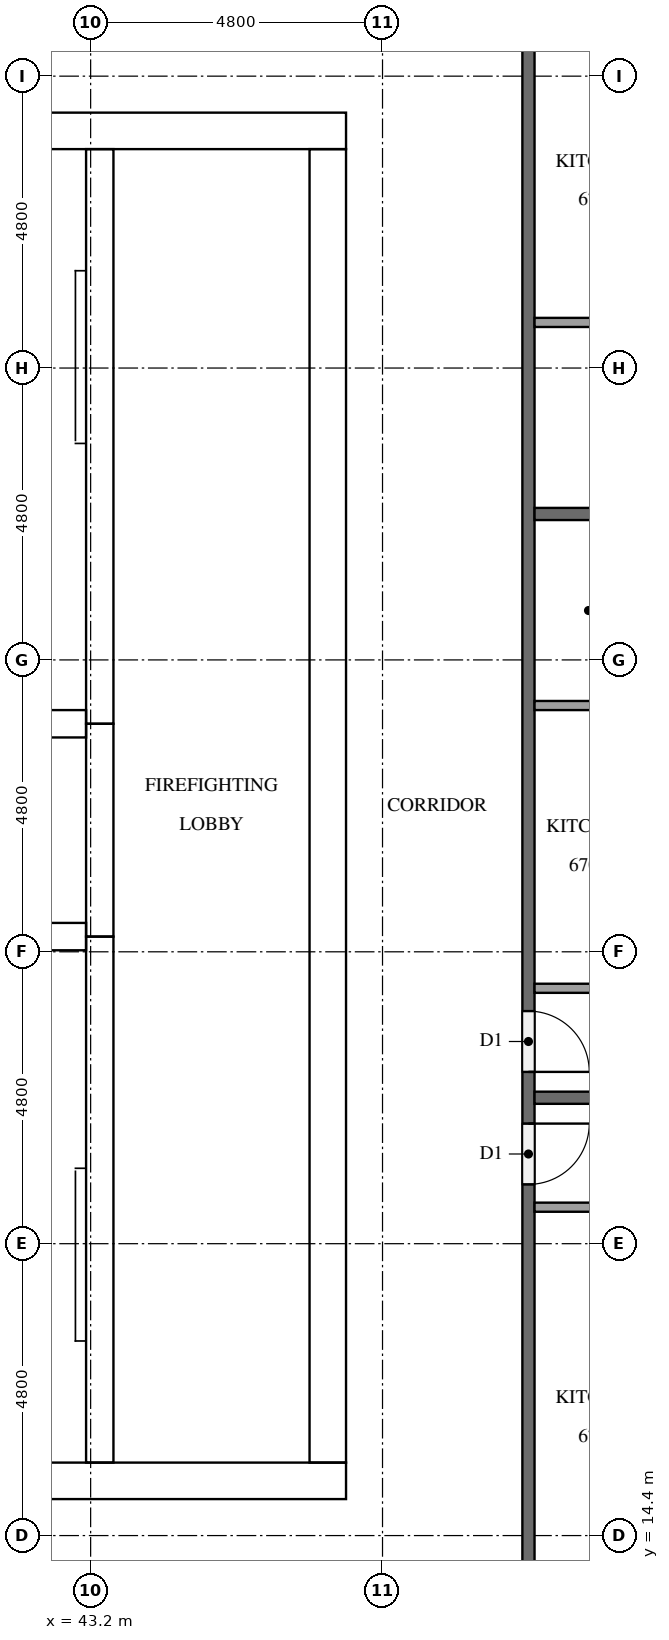
"""IFC4 building model, lengths in metres.
Left out: names, types, materials, properties, quantities, classifications, styles, units other than length and angle.
Written with IfcOpenShell. Run it as: python <this file> out.ifc"""

import sys

from ifc_helpers import new_model, si_unit, direction, frame, frame_2d, origin, place, context, subcontext, project, spatial, rectangle, extrude, element, fill, save


model = new_model("IFC4")
c1 = context("Model", 3, precision=1e-05, world=origin(), true_north=direction((0.0, 1.0)))
c2 = subcontext(c1, "Body", "Model", "MODEL_VIEW")
j1 = project(units=[si_unit("LENGTHUNIT", "METRE"), si_unit("PLANEANGLEUNIT", "RADIAN")], contexts=[c1])
p1 = place(None, origin())
s1 = spatial("IfcSite", under=j1, at=p1, CompositionType="ELEMENT")
p2 = place(p1, origin())
s2 = spatial("IfcBuilding", under=s1, at=p2, CompositionType="ELEMENT")
p3 = place(p2, frame((0.0, 0.0, 256.2)))
s3 = spatial("IfcBuildingStorey", under=s2, at=p3, CompositionType="ELEMENT", Elevation=256.2)
p4 = place(p3, frame((15.0, 15.3, 0.0), z_axis=(0.0, 0.0, 1.0), x_axis=(1.0, 0.0, 0.0)))
e1 = element("IfcWall", 1, at=p4, inside=s3, PredefinedType="SHEAR", context=c2, shape_type="SweptSolid", body=[
    extrude(rectangle(XDim=32.4, YDim=0.6, at=frame_2d((16.2, 0.0))), origin(), (0.0, 0.0, 1.0), 3.2),
])
p5 = place(p4, frame((15.3, 0.0, 0.0)))
e2 = element("IfcOpeningElement", 2, at=p5, cuts=e1, PredefinedType="OPENING", context=c2, shape_type="SweptSolid", body=[
    extrude(rectangle(XDim=1.8, YDim=2.1, at=frame_2d((0.9, 1.05))), frame((0.0, 0.31, 0.0), z_axis=(0.0, -1.0, 0.0), x_axis=(1.0, 0.0, 0.0)), (0.0, 0.0, 1.0), 0.62),
])
p6 = place(p3, frame((15.0, 37.5, 0.0), z_axis=(0.0, 0.0, 1.0), x_axis=(1.0, 0.0, 0.0)))
e3 = element("IfcWall", 3, at=p6, inside=s3, PredefinedType="SHEAR", context=c2, shape_type="SweptSolid", body=[
    extrude(rectangle(XDim=32.4, YDim=0.6, at=frame_2d((16.2, 0.0))), origin(), (0.0, 0.0, 1.0), 3.2),
])
p7 = place(p6, frame((15.3, 0.0, 0.0)))
e4 = element("IfcOpeningElement", 4, at=p7, cuts=e3, PredefinedType="OPENING", context=c2, shape_type="SweptSolid", body=[
    extrude(rectangle(XDim=1.8, YDim=2.1, at=frame_2d((0.9, 1.05))), frame((0.0, 0.31, 0.0), z_axis=(0.0, -1.0, 0.0), x_axis=(1.0, 0.0, 0.0)), (0.0, 0.0, 1.0), 0.62),
])
p8 = place(p6, frame((1.25, 0.0, 0.0)))
e5 = element("IfcOpeningElement", 5, at=p8, cuts=e3, PredefinedType="OPENING", context=c2, shape_type="SweptSolid", body=[
    extrude(rectangle(XDim=1.0, YDim=2.1, at=frame_2d((0.5, 1.05))), frame((0.0, 0.31, 0.0), z_axis=(0.0, -1.0, 0.0), x_axis=(1.0, 0.0, 0.0)), (0.0, 0.0, 1.0), 0.62),
])
p9 = place(p6, frame((4.988, 0.0, 0.0)))
e6 = element("IfcOpeningElement", 6, at=p9, cuts=e3, PredefinedType="OPENING", context=c2, shape_type="SweptSolid", body=[
    extrude(rectangle(XDim=1.0, YDim=2.1, at=frame_2d((0.5, 1.05))), frame((0.0, 0.31, 0.0), z_axis=(0.0, -1.0, 0.0), x_axis=(1.0, 0.0, 0.0)), (0.0, 0.0, 1.0), 0.62),
])
p10 = place(p3, frame((47.1, 15.6, 0.0), z_axis=(0.0, 0.0, 1.0), x_axis=(0.0, 1.0, 0.0)))
e7 = element("IfcWall", 7, at=p10, inside=s3, PredefinedType="SHEAR", context=c2, shape_type="SweptSolid", body=[
    extrude(rectangle(XDim=21.6, YDim=0.6, at=frame_2d((10.8, 0.0))), origin(), (0.0, 0.0, 1.0), 3.2),
])
p11 = place(p10, frame((10.5, 0.0, 0.0)))
e8 = element("IfcOpeningElement", 8, at=p11, cuts=e7, PredefinedType="OPENING", context=c2, shape_type="SweptSolid", body=[
    extrude(rectangle(XDim=1.2, YDim=2.1, at=frame_2d((0.6, 1.05))), frame((0.0, 0.31, 0.0), z_axis=(0.0, -1.0, 0.0), x_axis=(1.0, 0.0, 0.0)), (0.0, 0.0, 1.0), 0.62),
])
p12 = place(p3, frame((43.35, 15.6, 0.0), z_axis=(0.0, 0.0, 1.0), x_axis=(0.0, 1.0, 0.0)))
e9 = element("IfcWall", 9, at=p12, inside=s3, PredefinedType="SHEAR", context=c2, shape_type="SweptSolid", body=[
    extrude(rectangle(XDim=8.65, YDim=0.45, at=frame_2d((4.325, 0.0))), origin(), (0.0, 0.0, 1.0), 3.2),
])
p13 = place(p12, frame((0.6, 0.0, 0.0)))
e10 = element("IfcOpeningElement", 10, at=p13, cuts=e9, PredefinedType="OPENING", context=c2, shape_type="SweptSolid", body=[
    extrude(rectangle(XDim=1.2, YDim=2.1, at=frame_2d((0.6, 1.05))), frame((0.0, 0.235, 0.0), z_axis=(0.0, -1.0, 0.0), x_axis=(1.0, 0.0, 0.0)), (0.0, 0.0, 1.0), 0.47),
])
p14 = place(p3, frame((43.35, 24.25, 0.0), z_axis=(0.0, 0.0, 1.0), x_axis=(0.0, 1.0, 0.0)))
e11 = element("IfcWall", 11, at=p14, inside=s3, PredefinedType="SHEAR", context=c2, shape_type="SweptSolid", body=[
    extrude(rectangle(XDim=3.5, YDim=0.45, at=frame_2d((1.75, 0.0))), origin(), (0.0, 0.0, 1.0), 3.2),
])
p15 = place(p14, frame((1.2, 0.0, 0.0)))
e12 = element("IfcOpeningElement", 12, at=p15, cuts=e11, PredefinedType="OPENING", context=c2, shape_type="SweptSolid", body=[
    extrude(rectangle(XDim=1.1, YDim=2.1, at=frame_2d((0.55, 1.05))), frame((0.0, 0.235, 0.0), z_axis=(0.0, -1.0, 0.0), x_axis=(1.0, 0.0, 0.0)), (0.0, 0.0, 1.0), 0.47),
])
p16 = place(p3, frame((43.35, 27.75, 0.0), z_axis=(0.0, 0.0, 1.0), x_axis=(0.0, 1.0, 0.0)))
e13 = element("IfcWall", 13, at=p16, inside=s3, PredefinedType="SHEAR", context=c2, shape_type="SweptSolid", body=[
    extrude(rectangle(XDim=9.45, YDim=0.45, at=frame_2d((4.725, 0.0))), origin(), (0.0, 0.0, 1.0), 3.2),
])
p17 = place(p16, frame((7.65, 0.0, 0.0)))
e14 = element("IfcOpeningElement", 14, at=p17, cuts=e13, PredefinedType="OPENING", context=c2, shape_type="SweptSolid", body=[
    extrude(rectangle(XDim=1.2, YDim=2.1, at=frame_2d((0.6, 1.05))), frame((0.0, 0.235, 0.0), z_axis=(0.0, -1.0, 0.0), x_axis=(1.0, 0.0, 0.0)), (0.0, 0.0, 1.0), 0.47),
])
for number, where, z_axis, x_axis in (
    (15, (39.525, 24.25, 0.0), (0.0, 0.0, 1.0), (1.0, 0.0, 0.0)),
    (16, (39.525, 27.75, 0.0), (0.0, 0.0, 1.0), (1.0, 0.0, 0.0)),
):
    element("IfcWall", number, at=place(p3, frame(where, z_axis=z_axis, x_axis=x_axis)), inside=s3, PredefinedType="SHEAR", context=c2, shape_type="SweptSolid", body=[
        extrude(rectangle(XDim=3.6, YDim=0.45, at=frame_2d((1.8, 0.0))), origin(), (0.0, 0.0, 1.0), 3.2),
    ])
p18 = place(p3, frame((50.4, 40.7, 0.0), z_axis=(0.0, 0.0, 1.0), x_axis=(0.0, -1.0, 0.0)))
e17 = element("IfcWall", 17, at=p18, inside=s3, PredefinedType="PARTITIONING", context=c2, shape_type="SweptSolid", body=[
    extrude(rectangle(XDim=28.6, YDim=0.2, at=frame_2d((14.3, 0.0))), origin(), (0.0, 0.0, 1.0), 3.2),
])
p19 = place(p18, frame((19.525, 0.0, 0.0)))
e18 = element("IfcOpeningElement", 18, at=p19, cuts=e17, PredefinedType="OPENING", context=c2, shape_type="SweptSolid", body=[
    extrude(rectangle(XDim=1.0, YDim=2.1, at=frame_2d((0.5, 1.05))), frame((0.0, 0.11, 0.0), z_axis=(0.0, -1.0, 0.0), x_axis=(1.0, 0.0, 0.0)), (0.0, 0.0, 1.0), 0.22),
])
p20 = place(p18, frame((17.675, 0.0, 0.0)))
e19 = element("IfcOpeningElement", 19, at=p20, cuts=e17, PredefinedType="OPENING", context=c2, shape_type="SweptSolid", body=[
    extrude(rectangle(XDim=1.0, YDim=2.1, at=frame_2d((0.5, 1.05))), frame((0.0, 0.11, 0.0), z_axis=(0.0, -1.0, 0.0), x_axis=(1.0, 0.0, 0.0)), (0.0, 0.0, 1.0), 0.22),
])
p21 = place(p18, frame((0.325, 0.0, 0.0)))
e20 = element("IfcOpeningElement", 20, at=p21, cuts=e17, PredefinedType="OPENING", context=c2, shape_type="SweptSolid", body=[
    extrude(rectangle(XDim=1.0, YDim=2.1, at=frame_2d((0.5, 1.05))), frame((0.0, 0.11, 0.0), z_axis=(0.0, -1.0, 0.0), x_axis=(1.0, 0.0, 0.0)), (0.0, 0.0, 1.0), 0.22),
])
for number, where, z_axis, x_axis in (
    (21, (50.5, 21.6, 0.0), (0.0, 0.0, 1.0), (1.0, 0.0, 0.0)),
    (22, (50.5, 31.2, 0.0), (0.0, 0.0, 1.0), (1.0, 0.0, 0.0)),
):
    element("IfcWall", number, at=place(p3, frame(where, z_axis=z_axis, x_axis=x_axis)), inside=s3, PredefinedType="PARTITIONING", context=c2, shape_type="SweptSolid", body=[
        extrude(rectangle(XDim=7.0, YDim=0.2, at=frame_2d((3.5, 0.0))), origin(), (0.0, 0.0, 1.0), 3.2),
    ])
p22 = place(p3, frame((50.5, 19.8, 0.0), z_axis=(0.0, 0.0, 1.0), x_axis=(1.0, 0.0, 0.0)))
e23 = element("IfcWall", 23, at=p22, inside=s3, PredefinedType="PARTITIONING", context=c2, shape_type="SweptSolid", body=[
    extrude(rectangle(XDim=2.225, YDim=0.15, at=frame_2d((1.113, 0.0))), origin(), (0.0, 0.0, 1.0), 3.2),
])
p23 = place(p3, frame((50.5, 28.05, 0.0), z_axis=(0.0, 0.0, 1.0), x_axis=(1.0, 0.0, 0.0)))
e24 = element("IfcWall", 24, at=p23, inside=s3, PredefinedType="PARTITIONING", context=c2, shape_type="SweptSolid", body=[
    extrude(rectangle(XDim=1.775, YDim=0.15, at=frame_2d((0.887, 0.0))), origin(), (0.0, 0.0, 1.0), 3.2),
])
p24 = place(p3, frame((50.5, 23.4, 0.0), z_axis=(0.0, 0.0, 1.0), x_axis=(1.0, 0.0, 0.0)))
e25 = element("IfcWall", 25, at=p24, inside=s3, PredefinedType="PARTITIONING", context=c2, shape_type="SweptSolid", body=[
    extrude(rectangle(XDim=1.925, YDim=0.15, at=frame_2d((0.962, 0.0))), origin(), (0.0, 0.0, 1.0), 3.2),
])
p25 = place(p3, frame((50.5, 34.35, 0.0), z_axis=(0.0, 0.0, 1.0), x_axis=(1.0, 0.0, 0.0)))
e26 = element("IfcWall", 26, at=p25, inside=s3, PredefinedType="PARTITIONING", context=c2, shape_type="SweptSolid", body=[
    extrude(rectangle(XDim=2.075, YDim=0.15, at=frame_2d((1.038, 0.0))), origin(), (0.0, 0.0, 1.0), 3.2),
])
p26 = place(p15, origin())
e27 = element("IfcDoor", 27, at=p26, inside=s3, OperationType="DOUBLE_DOOR_SLIDING", PredefinedType="DOOR", context=c2, shape_type="SweptSolid", body=[
    extrude(rectangle(XDim=1.1, YDim=2.1, at=frame_2d((0.55, 1.05))), frame((0.0, 0.025, 0.0), z_axis=(0.0, -1.0, 0.0), x_axis=(1.0, 0.0, 0.0)), (0.0, 0.0, 1.0), 0.05),
])
fill(e12, e27)
p27 = place(p13, origin())
e28 = element("IfcDoor", 28, at=p27, inside=s3, OperationType="SINGLE_SWING_RIGHT", PredefinedType="DOOR", context=c2, shape_type="SweptSolid", body=[
    extrude(rectangle(XDim=1.2, YDim=2.1, at=frame_2d((0.6, 1.05))), frame((0.0, 0.025, 0.0), z_axis=(0.0, -1.0, 0.0), x_axis=(1.0, 0.0, 0.0)), (0.0, 0.0, 1.0), 0.05),
])
fill(e10, e28)
p28 = place(p17, origin())
e29 = element("IfcDoor", 29, at=p28, inside=s3, OperationType="SINGLE_SWING_LEFT", PredefinedType="DOOR", context=c2, shape_type="SweptSolid", body=[
    extrude(rectangle(XDim=1.2, YDim=2.1, at=frame_2d((0.6, 1.05))), frame((0.0, 0.025, 0.0), z_axis=(0.0, -1.0, 0.0), x_axis=(1.0, 0.0, 0.0)), (0.0, 0.0, 1.0), 0.05),
])
fill(e14, e29)
p29 = place(p11, origin())
e30 = element("IfcDoor", 30, at=p29, inside=s3, OperationType="SINGLE_SWING_LEFT", PredefinedType="DOOR", context=c2, shape_type="SweptSolid", body=[
    extrude(rectangle(XDim=1.2, YDim=2.1, at=frame_2d((0.6, 1.05))), frame((0.0, 0.025, 0.0), z_axis=(0.0, -1.0, 0.0), x_axis=(1.0, 0.0, 0.0)), (0.0, 0.0, 1.0), 0.05),
])
fill(e8, e30)
p30 = place(p19, origin())
e31 = element("IfcDoor", 31, at=p30, inside=s3, OperationType="SINGLE_SWING_LEFT", PredefinedType="DOOR", context=c2, shape_type="SweptSolid", body=[
    extrude(rectangle(XDim=1.0, YDim=2.1, at=frame_2d((0.5, 1.05))), frame((0.0, 0.025, 0.0), z_axis=(0.0, -1.0, 0.0), x_axis=(1.0, 0.0, 0.0)), (0.0, 0.0, 1.0), 0.05),
])
fill(e18, e31)
p31 = place(p20, origin())
e32 = element("IfcDoor", 32, at=p31, inside=s3, OperationType="SINGLE_SWING_RIGHT", PredefinedType="DOOR", context=c2, shape_type="SweptSolid", body=[
    extrude(rectangle(XDim=1.0, YDim=2.1, at=frame_2d((0.5, 1.05))), frame((0.0, 0.025, 0.0), z_axis=(0.0, -1.0, 0.0), x_axis=(1.0, 0.0, 0.0)), (0.0, 0.0, 1.0), 0.05),
])
fill(e19, e32)
save(model, sys.argv[1])
